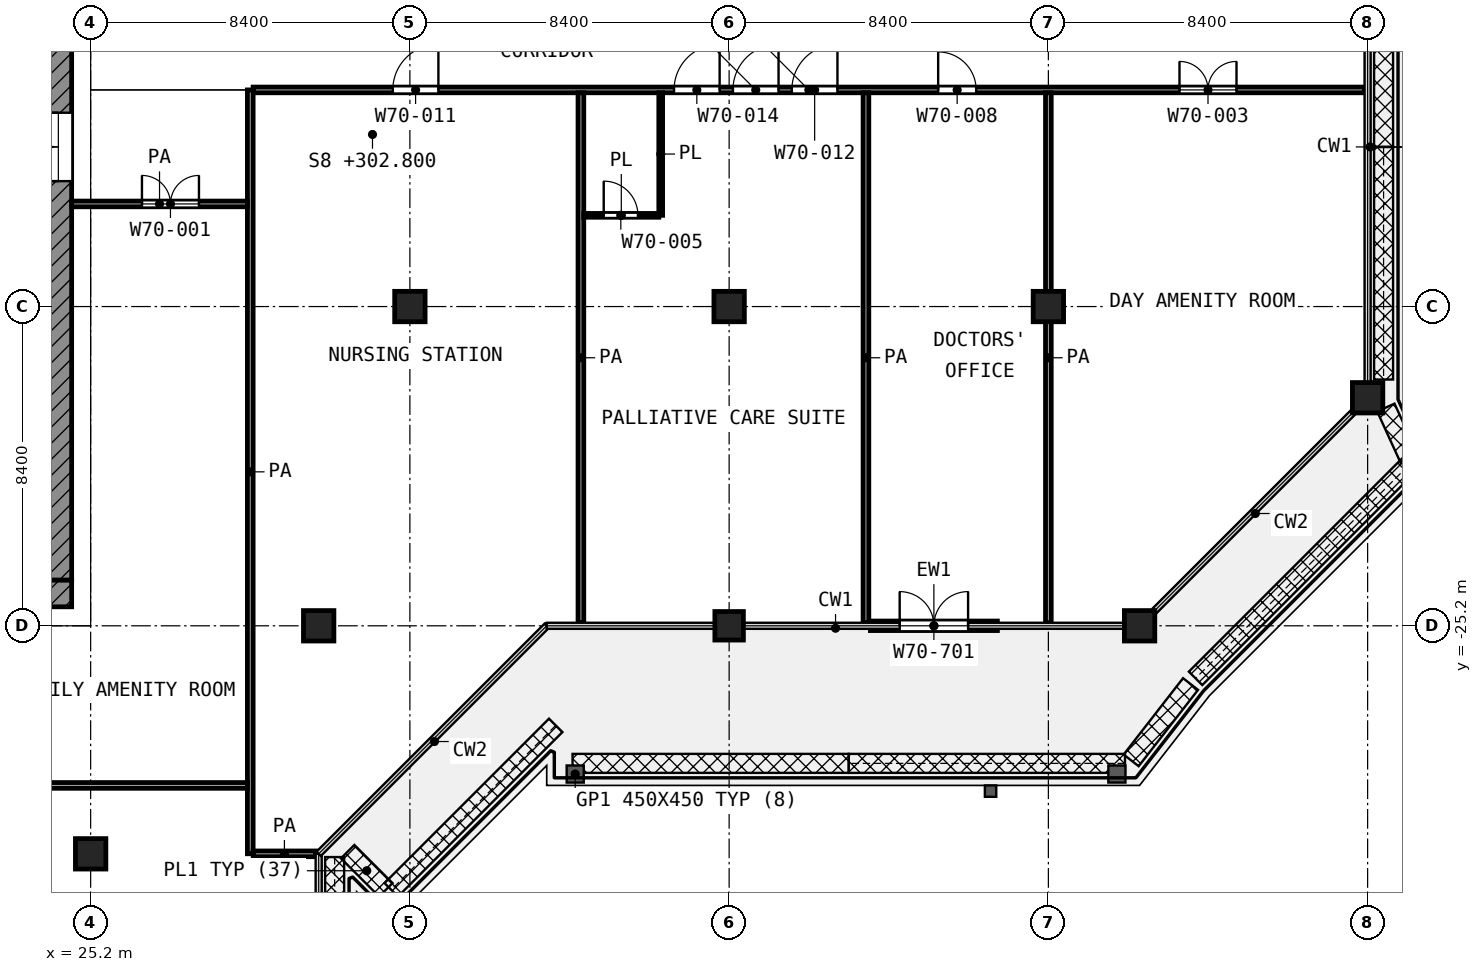
"""IFC4 building model, lengths in metres.
Left out: names, types, materials, properties, quantities, classifications, styles, units other than length and angle.
Written with IfcOpenShell. Run it as: python <this file> out.ifc"""

import sys

from ifc_helpers import new_model, si_unit, direction, frame, frame_2d, origin, origin_2d, place, context, subcontext, project, spatial, rectangle, extrude, element, fill, save


model = new_model("IFC4")
c1 = context("Model", 3, precision=1e-05, world=origin(), true_north=direction((0.0, 1.0)))
c2 = subcontext(c1, "Body", "Model", "MODEL_VIEW")
j1 = project(units=[si_unit("LENGTHUNIT", "METRE"), si_unit("PLANEANGLEUNIT", "RADIAN")], contexts=[c1])
p1 = place(None, origin())
s1 = spatial("IfcSite", under=j1, at=p1, CompositionType="ELEMENT")
p2 = place(p1, origin())
s2 = spatial("IfcBuilding", under=s1, at=p2, CompositionType="ELEMENT")
p3 = place(p2, frame((0.0, 0.0, 302.8)))
s3 = spatial("IfcBuildingStorey", under=s2, at=p3, CompositionType="ELEMENT", Elevation=302.8)
for number, where, z_axis, x_axis in (
    (1, (33.6, -16.8, 0.0), (0.0, 0.0, 1.0), (1.0, 0.0, 0.0)),
    (2, (42.0, -16.8, 0.0), (0.0, 0.0, 1.0), (1.0, 0.0, 0.0)),
    (3, (50.4, -16.8, 0.0), (0.0, 0.0, 1.0), (1.0, 0.0, 0.0)),
    (4, (58.8, -19.2, 0.0), (0.0, 0.0, 1.0), (1.0, 0.0, 0.0)),
    (5, (31.2, -25.2, 0.0), (0.0, 0.0, 1.0), (1.0, 0.0, 0.0)),
):
    element("IfcColumn", number, at=place(p3, frame(where, z_axis=z_axis, x_axis=x_axis)), inside=s3, PredefinedType="COLUMN", context=c2, shape_type="SweptSolid", body=[
        extrude(rectangle(XDim=0.8, YDim=0.8, at=origin_2d()), origin(), (0.0, 0.0, 1.0), 4.2),
    ])
p4 = place(p3, frame((42.0, -25.2, 0.0), z_axis=(0.0, 0.0, 1.0), x_axis=(1.0, 0.0, 0.0)))
e6 = element("IfcColumn", 6, at=p4, inside=s3, PredefinedType="COLUMN", context=c2, shape_type="SweptSolid", body=[
    extrude(rectangle(XDim=0.75, YDim=0.75, at=origin_2d()), origin(), (0.0, 0.0, 1.0), 4.2),
])
for number, where, z_axis, x_axis in (
    (7, (52.8, -25.2, 0.0), (0.0, 0.0, 1.0), (1.0, 0.0, 0.0)),
    (8, (25.2, -31.2, 0.0), (0.0, 0.0, 1.0), (1.0, 0.0, 0.0)),
):
    element("IfcColumn", number, at=place(p3, frame(where, z_axis=z_axis, x_axis=x_axis)), inside=s3, PredefinedType="COLUMN", context=c2, shape_type="SweptSolid", body=[
        extrude(rectangle(XDim=0.8, YDim=0.8, at=origin_2d()), origin(), (0.0, 0.0, 1.0), 4.2),
    ])
p5 = place(p3, frame((45.717, -25.2, 0.0), z_axis=(0.0, 0.0, 1.0), x_axis=(1.0, 0.0, 0.0)))
e9 = element("IfcWall", 9, at=p5, inside=s3, PredefinedType="SOLIDWALL", context=c2, shape_type="SweptSolid", body=[
    extrude(rectangle(XDim=3.342, YDim=0.25, at=frame_2d((1.671, 0.0))), origin(), (0.0, 0.0, 1.0), 3.48),
])
p6 = place(p5, frame((0.771, 0.0, 0.0)))
e10 = element("IfcOpeningElement", 10, at=p6, cuts=e9, PredefinedType="OPENING", context=c2, shape_type="SweptSolid", body=[
    extrude(rectangle(XDim=1.8, YDim=2.1, at=frame_2d((0.9, 1.05))), frame((0.0, 0.135, 0.0), z_axis=(0.0, -1.0, 0.0), x_axis=(1.0, 0.0, 0.0)), (0.0, 0.0, 1.0), 0.27),
])
p7 = place(p3, frame((24.35, -24.0, 0.0), z_axis=(0.0, 0.0, 1.0), x_axis=(0.0, 1.0, 0.0)))
e11 = element("IfcWall", 11, at=p7, inside=s3, PredefinedType="SHEAR", context=c2, shape_type="SweptSolid", body=[
    extrude(rectangle(XDim=18.6, YDim=0.7, at=frame_2d((9.3, 0.0))), origin(), (0.0, 0.0, 1.0), 3.6),
])
p8 = place(p7, frame((10.5, 0.0, 0.0)))
e12 = element("IfcOpeningElement", 12, at=p8, cuts=e11, PredefinedType="OPENING", context=c2, shape_type="SweptSolid", body=[
    extrude(rectangle(XDim=1.8, YDim=2.1, at=frame_2d((0.9, 1.05))), frame((0.0, 0.36, 0.0), z_axis=(0.0, -1.0, 0.0), x_axis=(1.0, 0.0, 0.0)), (0.0, 0.0, 1.0), 0.72),
])
p9 = place(p3, frame((24.35, -24.7, 0.0), z_axis=(0.0, 0.0, 1.0), x_axis=(0.0, 1.0, 0.0)))
e13 = element("IfcWall", 13, at=p9, inside=s3, PredefinedType="SHEAR", context=c2, shape_type="SweptSolid", body=[
    extrude(rectangle(XDim=0.7, YDim=0.7, at=frame_2d((0.35, 0.0))), origin(), (0.0, 0.0, 1.0), 3.6),
])
p10 = place(p3, frame((38.175, -14.4, 0.0), z_axis=(0.0, 0.0, 1.0), x_axis=(1.0, 0.0, 0.0)))
e14 = element("IfcWall", 14, at=p10, inside=s3, PredefinedType="PARTITIONING", context=c2, shape_type="SweptSolid", body=[
    extrude(rectangle(XDim=1.975, YDim=0.1, at=frame_2d((0.987, 0.0))), origin(), (0.0, 0.0, 1.0), 3.6),
])
p11 = place(p10, frame((0.525, 0.0, 0.0)))
e15 = element("IfcOpeningElement", 15, at=p11, cuts=e14, PredefinedType="OPENING", context=c2, shape_type="SweptSolid", body=[
    extrude(rectangle(XDim=0.9, YDim=2.1, at=frame_2d((0.45, 1.05))), frame((0.0, 0.06, 0.0), z_axis=(0.0, -1.0, 0.0), x_axis=(1.0, 0.0, 0.0)), (0.0, 0.0, 1.0), 0.12),
])
p12 = place(p3, frame((40.2, -14.4, 0.0), z_axis=(0.0, 0.0, 1.0), x_axis=(0.0, 1.0, 0.0)))
e16 = element("IfcWall", 16, at=p12, inside=s3, PredefinedType="PARTITIONING", context=c2, shape_type="SweptSolid", body=[
    extrude(rectangle(XDim=3.225, YDim=0.1, at=frame_2d((1.612, 0.0))), origin(), (0.0, 0.0, 1.0), 3.6),
])
p13 = place(p3, frame((29.477, -31.2, 0.0), z_axis=(0.0, 0.0, 1.0), x_axis=(1.0, 0.0, 0.0)))
e17 = element("IfcWall", 17, at=p13, inside=s3, PredefinedType="PARTITIONING", context=c2, shape_type="SweptSolid", body=[
    extrude(rectangle(XDim=1.643, YDim=0.15, at=frame_2d((0.822, 0.0))), origin(), (0.0, 0.0, 1.0), 3.6),
])
p14 = place(p3, frame((11.175, -29.4, 0.0), z_axis=(0.0, 0.0, 1.0), x_axis=(1.0, 0.0, 0.0)))
e18 = element("IfcWall", 18, at=p14, inside=s3, PredefinedType="PARTITIONING", context=c2, shape_type="SweptSolid", body=[
    extrude(rectangle(XDim=18.15, YDim=0.15, at=frame_2d((9.075, 0.0))), origin(), (0.0, 0.0, 1.0), 3.6),
])
p15 = place(p3, frame((24.7, -14.1, 0.0), z_axis=(0.0, 0.0, 1.0), x_axis=(1.0, 0.0, 0.0)))
e19 = element("IfcWall", 19, at=p15, inside=s3, PredefinedType="PARTITIONING", context=c2, shape_type="SweptSolid", body=[
    extrude(rectangle(XDim=4.625, YDim=0.15, at=frame_2d((2.312, 0.0))), origin(), (0.0, 0.0, 1.0), 3.6),
])
p16 = place(p15, frame((1.85, 0.0, 0.0)))
e20 = element("IfcOpeningElement", 20, at=p16, cuts=e19, PredefinedType="OPENING", context=c2, shape_type="SweptSolid", body=[
    extrude(rectangle(XDim=1.5, YDim=2.1, at=frame_2d((0.75, 1.05))), frame((0.0, 0.085, 0.0), z_axis=(0.0, -1.0, 0.0), x_axis=(1.0, 0.0, 0.0)), (0.0, 0.0, 1.0), 0.17),
])
p17 = place(p3, frame((29.475, -11.1, 0.0), z_axis=(0.0, 0.0, 1.0), x_axis=(1.0, 0.0, 0.0)))
e21 = element("IfcWall", 21, at=p17, inside=s3, PredefinedType="PARTITIONING", context=c2, shape_type="SweptSolid", body=[
    extrude(rectangle(XDim=29.245, YDim=0.15, at=frame_2d((14.623, 0.0))), origin(), (0.0, 0.0, 1.0), 3.6),
])
p18 = place(p17, frame((3.675, 0.0, 0.0)))
e22 = element("IfcOpeningElement", 22, at=p18, cuts=e21, PredefinedType="OPENING", context=c2, shape_type="SweptSolid", body=[
    extrude(rectangle(XDim=1.2, YDim=2.1, at=frame_2d((0.6, 1.05))), frame((0.0, 0.085, 0.0), z_axis=(0.0, -1.0, 0.0), x_axis=(1.0, 0.0, 0.0)), (0.0, 0.0, 1.0), 0.17),
])
p19 = place(p17, frame((14.175, 0.0, 0.0)))
e23 = element("IfcOpeningElement", 23, at=p19, cuts=e21, PredefinedType="OPENING", context=c2, shape_type="SweptSolid", body=[
    extrude(rectangle(XDim=1.2, YDim=2.1, at=frame_2d((0.6, 1.05))), frame((0.0, 0.085, 0.0), z_axis=(0.0, -1.0, 0.0), x_axis=(1.0, 0.0, 0.0)), (0.0, 0.0, 1.0), 0.17),
])
p20 = place(p17, frame((12.625, 0.0, 0.0)))
e24 = element("IfcOpeningElement", 24, at=p20, cuts=e21, PredefinedType="OPENING", context=c2, shape_type="SweptSolid", body=[
    extrude(rectangle(XDim=1.2, YDim=2.1, at=frame_2d((0.6, 1.05))), frame((0.0, 0.085, 0.0), z_axis=(0.0, -1.0, 0.0), x_axis=(1.0, 0.0, 0.0)), (0.0, 0.0, 1.0), 0.17),
])
p21 = place(p17, frame((11.075, 0.0, 0.0)))
e25 = element("IfcOpeningElement", 25, at=p21, cuts=e21, PredefinedType="OPENING", context=c2, shape_type="SweptSolid", body=[
    extrude(rectangle(XDim=1.2, YDim=2.1, at=frame_2d((0.6, 1.05))), frame((0.0, 0.085, 0.0), z_axis=(0.0, -1.0, 0.0), x_axis=(1.0, 0.0, 0.0)), (0.0, 0.0, 1.0), 0.17),
])
p22 = place(p17, frame((18.025, 0.0, 0.0)))
e26 = element("IfcOpeningElement", 26, at=p22, cuts=e21, PredefinedType="OPENING", context=c2, shape_type="SweptSolid", body=[
    extrude(rectangle(XDim=1.0, YDim=2.1, at=frame_2d((0.5, 1.05))), frame((0.0, 0.085, 0.0), z_axis=(0.0, -1.0, 0.0), x_axis=(1.0, 0.0, 0.0)), (0.0, 0.0, 1.0), 0.17),
])
p23 = place(p17, frame((24.375, 0.0, 0.0)))
e27 = element("IfcOpeningElement", 27, at=p23, cuts=e21, PredefinedType="OPENING", context=c2, shape_type="SweptSolid", body=[
    extrude(rectangle(XDim=1.5, YDim=2.1, at=frame_2d((0.75, 1.05))), frame((0.0, 0.085, 0.0), z_axis=(0.0, -1.0, 0.0), x_axis=(1.0, 0.0, 0.0)), (0.0, 0.0, 1.0), 0.17),
])
p24 = place(p3, frame((29.4, -31.198, 0.0), z_axis=(0.0, 0.0, 1.0), x_axis=(0.0, 1.0, 0.0)))
e28 = element("IfcWall", 28, at=p24, inside=s3, PredefinedType="PARTITIONING", context=c2, shape_type="SweptSolid", body=[
    extrude(rectangle(XDim=20.098, YDim=0.15, at=frame_2d((10.049, 0.0))), origin(), (0.0, 0.0, 1.0), 3.6),
])
for number, where, z_axis, x_axis in (
    (29, (38.1, -25.12, 0.0), (0.0, 0.0, 1.0), (0.0, 1.0, 0.0)),
    (30, (45.6, -25.12, 0.0), (0.0, 0.0, 1.0), (0.0, 1.0, 0.0)),
    (31, (50.4, -25.12, 0.0), (0.0, 0.0, 1.0), (0.0, 1.0, 0.0)),
):
    element("IfcWall", number, at=place(p3, frame(where, z_axis=z_axis, x_axis=x_axis)), inside=s3, PredefinedType="PARTITIONING", context=c2, shape_type="SweptSolid", body=[
        extrude(rectangle(XDim=13.945, YDim=0.15, at=frame_2d((6.973, 0.0))), origin(), (0.0, 0.0, 1.0), 3.6),
    ])
p25 = place(p6, origin())
e32 = element("IfcDoor", 32, at=p25, inside=s3, OperationType="DOUBLE_DOOR_SINGLE_SWING", PredefinedType="DOOR", context=c2, shape_type="SweptSolid", body=[
    extrude(rectangle(XDim=1.8, YDim=2.1, at=frame_2d((0.9, 1.05))), frame((0.0, 0.025, 0.0), z_axis=(0.0, -1.0, 0.0), x_axis=(1.0, 0.0, 0.0)), (0.0, 0.0, 1.0), 0.05),
])
fill(e10, e32)
p26 = place(p8, origin())
e33 = element("IfcDoor", 33, at=p26, inside=s3, OperationType="DOUBLE_DOOR_SINGLE_SWING", PredefinedType="DOOR", context=c2, shape_type="SweptSolid", body=[
    extrude(rectangle(XDim=1.8, YDim=2.1, at=frame_2d((0.9, 1.05))), frame((0.0, 0.025, 0.0), z_axis=(0.0, -1.0, 0.0), x_axis=(1.0, 0.0, 0.0)), (0.0, 0.0, 1.0), 0.05),
])
fill(e12, e33)
p27 = place(p16, origin())
e34 = element("IfcDoor", 34, at=p27, inside=s3, OperationType="DOUBLE_DOOR_SINGLE_SWING", PredefinedType="DOOR", context=c2, shape_type="SweptSolid", body=[
    extrude(rectangle(XDim=1.5, YDim=2.1, at=frame_2d((0.75, 1.05))), frame((0.0, 0.025, 0.0), z_axis=(0.0, -1.0, 0.0), x_axis=(1.0, 0.0, 0.0)), (0.0, 0.0, 1.0), 0.05),
])
fill(e20, e34)
p28 = place(p18, origin())
e35 = element("IfcDoor", 35, at=p28, inside=s3, OperationType="SINGLE_SWING_RIGHT", PredefinedType="DOOR", context=c2, shape_type="SweptSolid", body=[
    extrude(rectangle(XDim=1.2, YDim=2.1, at=frame_2d((0.6, 1.05))), frame((0.0, 0.025, 0.0), z_axis=(0.0, -1.0, 0.0), x_axis=(1.0, 0.0, 0.0)), (0.0, 0.0, 1.0), 0.05),
])
fill(e22, e35)
p29 = place(p19, origin())
e36 = element("IfcDoor", 36, at=p29, inside=s3, OperationType="SINGLE_SWING_RIGHT", PredefinedType="DOOR", context=c2, shape_type="SweptSolid", body=[
    extrude(rectangle(XDim=1.2, YDim=2.1, at=frame_2d((0.6, 1.05))), frame((0.0, 0.025, 0.0), z_axis=(0.0, -1.0, 0.0), x_axis=(1.0, 0.0, 0.0)), (0.0, 0.0, 1.0), 0.05),
])
fill(e23, e36)
p30 = place(p20, origin())
e37 = element("IfcDoor", 37, at=p30, inside=s3, OperationType="SINGLE_SWING_RIGHT", PredefinedType="DOOR", context=c2, shape_type="SweptSolid", body=[
    extrude(rectangle(XDim=1.2, YDim=2.1, at=frame_2d((0.6, 1.05))), frame((0.0, 0.025, 0.0), z_axis=(0.0, -1.0, 0.0), x_axis=(1.0, 0.0, 0.0)), (0.0, 0.0, 1.0), 0.05),
])
fill(e24, e37)
p31 = place(p21, origin())
e38 = element("IfcDoor", 38, at=p31, inside=s3, OperationType="SINGLE_SWING_RIGHT", PredefinedType="DOOR", context=c2, shape_type="SweptSolid", body=[
    extrude(rectangle(XDim=1.2, YDim=2.1, at=frame_2d((0.6, 1.05))), frame((0.0, 0.025, 0.0), z_axis=(0.0, -1.0, 0.0), x_axis=(1.0, 0.0, 0.0)), (0.0, 0.0, 1.0), 0.05),
])
fill(e25, e38)
p32 = place(p11, origin())
e39 = element("IfcDoor", 39, at=p32, inside=s3, OperationType="SINGLE_SWING_LEFT", PredefinedType="DOOR", context=c2, shape_type="SweptSolid", body=[
    extrude(rectangle(XDim=0.9, YDim=2.1, at=frame_2d((0.45, 1.05))), frame((0.0, 0.025, 0.0), z_axis=(0.0, -1.0, 0.0), x_axis=(1.0, 0.0, 0.0)), (0.0, 0.0, 1.0), 0.05),
])
fill(e15, e39)
p33 = place(p22, origin())
e40 = element("IfcDoor", 40, at=p33, inside=s3, OperationType="SINGLE_SWING_LEFT", PredefinedType="DOOR", context=c2, shape_type="SweptSolid", body=[
    extrude(rectangle(XDim=1.0, YDim=2.1, at=frame_2d((0.5, 1.05))), frame((0.0, 0.025, 0.0), z_axis=(0.0, -1.0, 0.0), x_axis=(1.0, 0.0, 0.0)), (0.0, 0.0, 1.0), 0.05),
])
fill(e26, e40)
p34 = place(p23, origin())
e41 = element("IfcDoor", 41, at=p34, inside=s3, OperationType="DOUBLE_DOOR_SINGLE_SWING", PredefinedType="DOOR", context=c2, shape_type="SweptSolid", body=[
    extrude(rectangle(XDim=1.5, YDim=2.1, at=frame_2d((0.75, 1.05))), frame((0.0, 0.025, 0.0), z_axis=(0.0, -1.0, 0.0), x_axis=(1.0, 0.0, 0.0)), (0.0, 0.0, 1.0), 0.05),
])
fill(e27, e41)
save(model, sys.argv[1])
